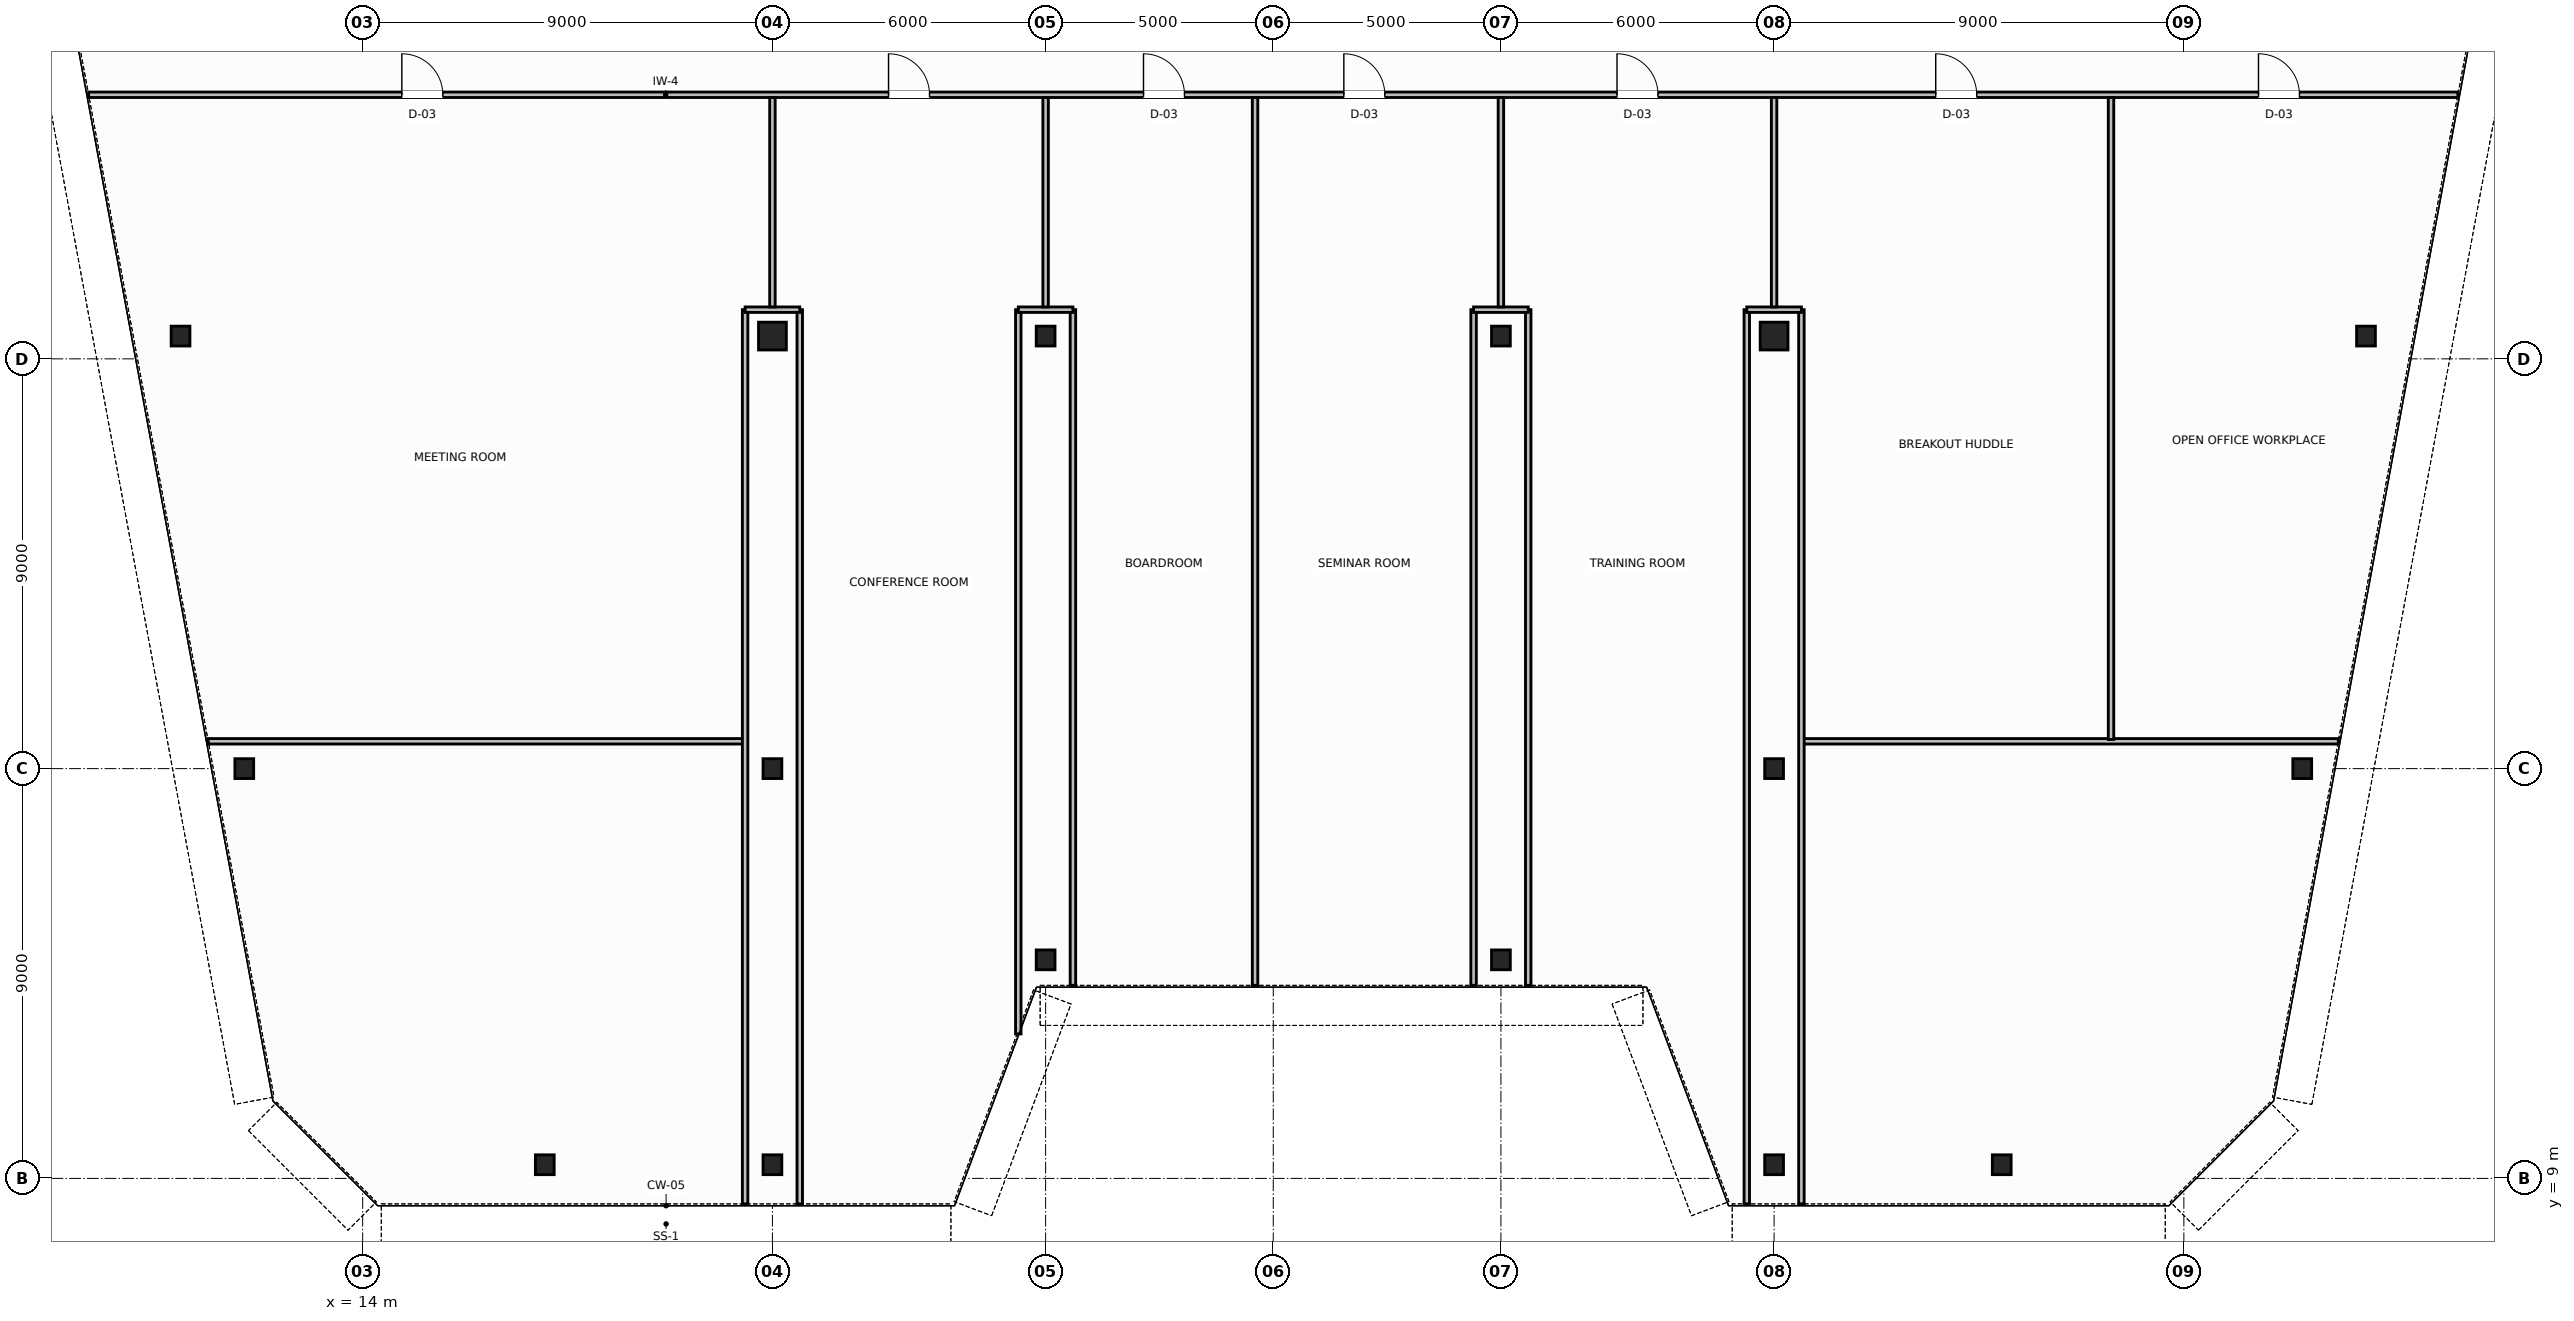
"""IFC4 building model, lengths in metres.
Left out: names, types, materials, properties, quantities, classifications, styles, units other than length and angle.
Written with IfcOpenShell. Run it as: python <this file> out.ifc"""

import sys

from ifc_helpers import new_model, si_unit, direction, frame, frame_2d, origin, origin_2d, place, context, subcontext, project, spatial, rectangle, hollow_circle, i_section, extrude, source, transform, mapped, element, fill, save


model = new_model("IFC4")
c1 = context("Model", 3, precision=1e-05, world=origin(), true_north=direction((0.0, 1.0)))
c2 = subcontext(c1, "Body", "Model", "MODEL_VIEW")
j1 = project(units=[si_unit("LENGTHUNIT", "METRE"), si_unit("PLANEANGLEUNIT", "RADIAN")], contexts=[c1])
p1 = place(None, origin())
s1 = spatial("IfcSite", under=j1, at=p1, CompositionType="ELEMENT")
p2 = place(p1, origin())
s2 = spatial("IfcBuilding", under=s1, at=p2, CompositionType="ELEMENT")
p3 = place(p2, frame((0.0, 0.0, 234.6)))
s3 = spatial("IfcBuildingStorey", under=s2, at=p3, CompositionType="ELEMENT", Elevation=234.6)
m1 = source(origin(), c2, "Body", "SweptSolid", [
    extrude(i_section(OverallWidth=0.412, OverallDepth=0.435, WebThickness=0.036, FlangeThickness=0.05, FilletRadius=0.015, at=origin_2d()), origin(), (0.0, 0.0, 1.0), 3.8),
])
for number, where, z_axis, x_axis in (
    (1, (10.0, 27.5, 0.0), (0.0, 0.0, 1.0), (1.0, 0.0, 0.0)),
    (2, (11.4, 18.0, 0.0), (0.0, 0.0, 1.0), (1.0, 0.0, 0.0)),
    (3, (58.0, 27.5, 0.0), (0.0, 0.0, 1.0), (1.0, 0.0, 0.0)),
    (4, (56.6, 18.0, 0.0), (0.0, 0.0, 1.0), (1.0, 0.0, 0.0)),
):
    element("IfcColumn", number, at=place(p3, frame(where, z_axis=z_axis, x_axis=x_axis)), inside=s3, PredefinedType="COLUMN", context=c2, shape_type="MappedRepresentation", body=[
        mapped(m1, transform((0.0, 0.0, 0.0), scale=1.0)),
    ])
m2 = source(origin(), c2, "Body", "SweptSolid", [
    extrude(hollow_circle(Radius=0.305, WallThickness=0.03, at=origin_2d()), origin(), (0.0, 0.0, 1.0), 3.8),
])
p4 = place(p3, frame((23.0, 27.5, 0.0), z_axis=(0.0, 0.0, 1.0), x_axis=(1.0, 0.0, 0.0)))
e5 = element("IfcColumn", 5, at=p4, inside=s3, PredefinedType="COLUMN", context=c2, shape_type="MappedRepresentation", body=[
    mapped(m2, transform((0.0, 0.0, 0.0), scale=1.0)),
])
m3 = source(origin(), c2, "Body", "SweptSolid", [
    extrude(i_section(OverallWidth=0.412, OverallDepth=0.435, WebThickness=0.036, FlangeThickness=0.05, FilletRadius=0.015, at=origin_2d()), origin(), (0.0, 0.0, 1.0), 3.8),
])
for number, where, z_axis, x_axis in (
    (6, (29.0, 27.5, 0.0), (0.0, 0.0, 1.0), (1.0, 0.0, 0.0)),
    (7, (39.0, 27.5, 0.0), (0.0, 0.0, 1.0), (1.0, 0.0, 0.0)),
):
    element("IfcColumn", number, at=place(p3, frame(where, z_axis=z_axis, x_axis=x_axis)), inside=s3, PredefinedType="COLUMN", context=c2, shape_type="MappedRepresentation", body=[
        mapped(m3, transform((0.0, 0.0, 0.0), scale=1.0)),
    ])
p5 = place(p3, frame((45.0, 27.5, 0.0), z_axis=(0.0, 0.0, 1.0), x_axis=(1.0, 0.0, 0.0)))
e8 = element("IfcColumn", 8, at=p5, inside=s3, PredefinedType="COLUMN", context=c2, shape_type="MappedRepresentation", body=[
    mapped(m2, transform((0.0, 0.0, 0.0), scale=1.0)),
])
for number, where, z_axis, x_axis in (
    (9, (23.0, 18.0, 0.0), (0.0, 0.0, 1.0), (1.0, 0.0, 0.0)),
    (10, (45.0, 18.0, 0.0), (0.0, 0.0, 1.0), (1.0, 0.0, 0.0)),
    (11, (18.0, 9.3, 0.0), (0.0, 0.0, 1.0), (1.0, 0.0, 0.0)),
    (12, (23.0, 9.3, 0.0), (0.0, 0.0, 1.0), (1.0, 0.0, 0.0)),
    (13, (29.0, 13.8, 0.0), (0.0, 0.0, 1.0), (1.0, 0.0, 0.0)),
    (14, (39.0, 13.8, 0.0), (0.0, 0.0, 1.0), (1.0, 0.0, 0.0)),
    (15, (45.0, 9.3, 0.0), (0.0, 0.0, 1.0), (1.0, 0.0, 0.0)),
    (16, (50.0, 9.3, 0.0), (0.0, 0.0, 1.0), (1.0, 0.0, 0.0)),
):
    element("IfcColumn", number, at=place(p3, frame(where, z_axis=z_axis, x_axis=x_axis)), inside=s3, PredefinedType="COLUMN", context=c2, shape_type="MappedRepresentation", body=[
        mapped(m3, transform((0.0, 0.0, 0.0), scale=1.0)),
    ])
p6 = place(p3, frame((7.981, 32.8, 0.0), z_axis=(0.0, 0.0, 1.0), x_axis=(1.0, 0.0, 0.0)))
e17 = element("IfcWall", 17, at=p6, inside=s3, PredefinedType="PARTITIONING", context=c2, shape_type="SweptSolid", body=[
    extrude(rectangle(XDim=52.038, YDim=0.12, at=frame_2d((26.019, 0.0))), origin(), (0.0, 0.0, 1.0), 3.58),
])
p7 = place(p6, frame((6.879, 0.0, 0.0)))
e18 = element("IfcOpeningElement", 18, at=p7, cuts=e17, PredefinedType="OPENING", context=c2, shape_type="SweptSolid", body=[
    extrude(rectangle(XDim=0.9, YDim=2.15, at=frame_2d((0.45, 1.075))), frame((0.0, 0.07, 0.0), z_axis=(0.0, -1.0, 0.0), x_axis=(1.0, 0.0, 0.0)), (0.0, 0.0, 1.0), 0.14),
])
p8 = place(p6, frame((17.569, 0.0, 0.0)))
e19 = element("IfcOpeningElement", 19, at=p8, cuts=e17, PredefinedType="OPENING", context=c2, shape_type="SweptSolid", body=[
    extrude(rectangle(XDim=0.9, YDim=2.15, at=frame_2d((0.45, 1.075))), frame((0.0, 0.07, 0.0), z_axis=(0.0, -1.0, 0.0), x_axis=(1.0, 0.0, 0.0)), (0.0, 0.0, 1.0), 0.14),
])
p9 = place(p6, frame((23.169, 0.0, 0.0)))
e20 = element("IfcOpeningElement", 20, at=p9, cuts=e17, PredefinedType="OPENING", context=c2, shape_type="SweptSolid", body=[
    extrude(rectangle(XDim=0.9, YDim=2.15, at=frame_2d((0.45, 1.075))), frame((0.0, 0.07, 0.0), z_axis=(0.0, -1.0, 0.0), x_axis=(1.0, 0.0, 0.0)), (0.0, 0.0, 1.0), 0.14),
])
p10 = place(p6, frame((27.569, 0.0, 0.0)))
e21 = element("IfcOpeningElement", 21, at=p10, cuts=e17, PredefinedType="OPENING", context=c2, shape_type="SweptSolid", body=[
    extrude(rectangle(XDim=0.9, YDim=2.15, at=frame_2d((0.45, 1.075))), frame((0.0, 0.07, 0.0), z_axis=(0.0, -1.0, 0.0), x_axis=(1.0, 0.0, 0.0)), (0.0, 0.0, 1.0), 0.14),
])
p11 = place(p6, frame((33.569, 0.0, 0.0)))
e22 = element("IfcOpeningElement", 22, at=p11, cuts=e17, PredefinedType="OPENING", context=c2, shape_type="SweptSolid", body=[
    extrude(rectangle(XDim=0.9, YDim=2.15, at=frame_2d((0.45, 1.075))), frame((0.0, 0.07, 0.0), z_axis=(0.0, -1.0, 0.0), x_axis=(1.0, 0.0, 0.0)), (0.0, 0.0, 1.0), 0.14),
])
p12 = place(p6, frame((40.569, 0.0, 0.0)))
e23 = element("IfcOpeningElement", 23, at=p12, cuts=e17, PredefinedType="OPENING", context=c2, shape_type="SweptSolid", body=[
    extrude(rectangle(XDim=0.9, YDim=2.15, at=frame_2d((0.45, 1.075))), frame((0.0, 0.07, 0.0), z_axis=(0.0, -1.0, 0.0), x_axis=(1.0, 0.0, 0.0)), (0.0, 0.0, 1.0), 0.14),
])
p13 = place(p6, frame((47.658, 0.0, 0.0)))
e24 = element("IfcOpeningElement", 24, at=p13, cuts=e17, PredefinedType="OPENING", context=c2, shape_type="SweptSolid", body=[
    extrude(rectangle(XDim=0.9, YDim=2.15, at=frame_2d((0.45, 1.075))), frame((0.0, 0.07, 0.0), z_axis=(0.0, -1.0, 0.0), x_axis=(1.0, 0.0, 0.0)), (0.0, 0.0, 1.0), 0.14),
])
for number, where, z_axis, x_axis in (
    (25, (10.608, 18.6, 0.0), (0.0, 0.0, 1.0), (1.0, 0.0, 0.0)),
    (26, (45.64, 18.6, 0.0), (0.0, 0.0, 1.0), (1.0, 0.0, 0.0)),
):
    element("IfcWall", number, at=place(p3, frame(where, z_axis=z_axis, x_axis=x_axis)), inside=s3, PredefinedType="PARTITIONING", context=c2, shape_type="SweptSolid", body=[
        extrude(rectangle(XDim=11.752, YDim=0.12, at=frame_2d((5.876, 0.0))), origin(), (0.0, 0.0, 1.0), 3.58),
    ])
for number, where, z_axis, x_axis in (
    (27, (22.4, 8.44, 0.0), (0.0, 0.0, 1.0), (0.0, 1.0, 0.0)),
    (28, (23.6, 8.44, 0.0), (0.0, 0.0, 1.0), (0.0, 1.0, 0.0)),
):
    element("IfcWall", number, at=place(p3, frame(where, z_axis=z_axis, x_axis=x_axis)), inside=s3, PredefinedType="PARTITIONING", context=c2, shape_type="SweptSolid", body=[
        extrude(rectangle(XDim=19.64, YDim=0.12, at=frame_2d((9.82, 0.0))), origin(), (0.0, 0.0, 1.0), 3.58),
    ])
p14 = place(p3, frame((22.4, 28.08, 0.0), z_axis=(0.0, 0.0, 1.0), x_axis=(1.0, 0.0, 0.0)))
e29 = element("IfcWall", 29, at=p14, inside=s3, PredefinedType="PARTITIONING", context=c2, shape_type="SweptSolid", body=[
    extrude(rectangle(XDim=1.2, YDim=0.12, at=frame_2d((0.6, 0.0))), origin(), (0.0, 0.0, 1.0), 3.58),
])
p15 = place(p3, frame((23.0, 28.14, 0.0), z_axis=(0.0, 0.0, 1.0), x_axis=(0.0, 1.0, 0.0)))
e30 = element("IfcWall", 30, at=p15, inside=s3, PredefinedType="PARTITIONING", context=c2, shape_type="SweptSolid", body=[
    extrude(rectangle(XDim=4.6, YDim=0.12, at=frame_2d((2.3, 0.0))), origin(), (0.0, 0.0, 1.0), 2.37),
])
p16 = place(p3, frame((28.4, 12.173, 0.0), z_axis=(0.0, 0.0, 1.0), x_axis=(0.0, 1.0, 0.0)))
e31 = element("IfcWall", 31, at=p16, inside=s3, PredefinedType="PARTITIONING", context=c2, shape_type="SweptSolid", body=[
    extrude(rectangle(XDim=15.907, YDim=0.12, at=frame_2d((7.953, 0.0))), origin(), (0.0, 0.0, 1.0), 3.58),
])
p17 = place(p3, frame((29.6, 13.24, 0.0), z_axis=(0.0, 0.0, 1.0), x_axis=(0.0, 1.0, 0.0)))
e32 = element("IfcWall", 32, at=p17, inside=s3, PredefinedType="PARTITIONING", context=c2, shape_type="SweptSolid", body=[
    extrude(rectangle(XDim=14.84, YDim=0.12, at=frame_2d((7.42, 0.0))), origin(), (0.0, 0.0, 1.0), 3.58),
])
p18 = place(p3, frame((28.4, 28.08, 0.0), z_axis=(0.0, 0.0, 1.0), x_axis=(1.0, 0.0, 0.0)))
e33 = element("IfcWall", 33, at=p18, inside=s3, PredefinedType="PARTITIONING", context=c2, shape_type="SweptSolid", body=[
    extrude(rectangle(XDim=1.2, YDim=0.12, at=frame_2d((0.6, 0.0))), origin(), (0.0, 0.0, 1.0), 3.58),
])
p19 = place(p3, frame((29.0, 28.14, 0.0), z_axis=(0.0, 0.0, 1.0), x_axis=(0.0, 1.0, 0.0)))
e34 = element("IfcWall", 34, at=p19, inside=s3, PredefinedType="PARTITIONING", context=c2, shape_type="SweptSolid", body=[
    extrude(rectangle(XDim=4.6, YDim=0.12, at=frame_2d((2.3, 0.0))), origin(), (0.0, 0.0, 1.0), 2.37),
])
for number, where, z_axis, x_axis in (
    (35, (38.4, 13.24, 0.0), (0.0, 0.0, 1.0), (0.0, 1.0, 0.0)),
    (36, (39.6, 13.24, 0.0), (0.0, 0.0, 1.0), (0.0, 1.0, 0.0)),
):
    element("IfcWall", number, at=place(p3, frame(where, z_axis=z_axis, x_axis=x_axis)), inside=s3, PredefinedType="PARTITIONING", context=c2, shape_type="SweptSolid", body=[
        extrude(rectangle(XDim=14.84, YDim=0.12, at=frame_2d((7.42, 0.0))), origin(), (0.0, 0.0, 1.0), 3.58),
    ])
p20 = place(p3, frame((38.4, 28.08, 0.0), z_axis=(0.0, 0.0, 1.0), x_axis=(1.0, 0.0, 0.0)))
e37 = element("IfcWall", 37, at=p20, inside=s3, PredefinedType="PARTITIONING", context=c2, shape_type="SweptSolid", body=[
    extrude(rectangle(XDim=1.2, YDim=0.12, at=frame_2d((0.6, 0.0))), origin(), (0.0, 0.0, 1.0), 3.58),
])
p21 = place(p3, frame((39.0, 28.14, 0.0), z_axis=(0.0, 0.0, 1.0), x_axis=(0.0, 1.0, 0.0)))
e38 = element("IfcWall", 38, at=p21, inside=s3, PredefinedType="PARTITIONING", context=c2, shape_type="SweptSolid", body=[
    extrude(rectangle(XDim=4.6, YDim=0.12, at=frame_2d((2.3, 0.0))), origin(), (0.0, 0.0, 1.0), 2.37),
])
for number, where, z_axis, x_axis in (
    (39, (44.4, 8.44, 0.0), (0.0, 0.0, 1.0), (0.0, 1.0, 0.0)),
    (40, (45.6, 8.44, 0.0), (0.0, 0.0, 1.0), (0.0, 1.0, 0.0)),
):
    element("IfcWall", number, at=place(p3, frame(where, z_axis=z_axis, x_axis=x_axis)), inside=s3, PredefinedType="PARTITIONING", context=c2, shape_type="SweptSolid", body=[
        extrude(rectangle(XDim=19.64, YDim=0.12, at=frame_2d((9.82, 0.0))), origin(), (0.0, 0.0, 1.0), 3.58),
    ])
p22 = place(p3, frame((44.4, 28.08, 0.0), z_axis=(0.0, 0.0, 1.0), x_axis=(1.0, 0.0, 0.0)))
e41 = element("IfcWall", 41, at=p22, inside=s3, PredefinedType="PARTITIONING", context=c2, shape_type="SweptSolid", body=[
    extrude(rectangle(XDim=1.2, YDim=0.12, at=frame_2d((0.6, 0.0))), origin(), (0.0, 0.0, 1.0), 3.58),
])
p23 = place(p3, frame((45.0, 28.14, 0.0), z_axis=(0.0, 0.0, 1.0), x_axis=(0.0, 1.0, 0.0)))
e42 = element("IfcWall", 42, at=p23, inside=s3, PredefinedType="PARTITIONING", context=c2, shape_type="SweptSolid", body=[
    extrude(rectangle(XDim=4.6, YDim=0.12, at=frame_2d((2.3, 0.0))), origin(), (0.0, 0.0, 1.0), 2.37),
])
p24 = place(p3, frame((33.6, 13.24, 0.0), z_axis=(0.0, 0.0, 1.0), x_axis=(0.0, 1.0, 0.0)))
e43 = element("IfcWall", 43, at=p24, inside=s3, PredefinedType="PARTITIONING", context=c2, shape_type="SweptSolid", body=[
    extrude(rectangle(XDim=19.5, YDim=0.12, at=frame_2d((9.75, 0.0))), origin(), (0.0, 0.0, 1.0), 3.58),
])
p25 = place(p3, frame((52.4, 18.64, 0.0), z_axis=(0.0, 0.0, 1.0), x_axis=(0.0, 1.0, 0.0)))
e44 = element("IfcWall", 44, at=p25, inside=s3, PredefinedType="PARTITIONING", context=c2, shape_type="SweptSolid", body=[
    extrude(rectangle(XDim=14.1, YDim=0.12, at=frame_2d((7.05, 0.0))), origin(), (0.0, 0.0, 1.0), 3.58),
])
m4 = source(origin(), c2, "Body", "SweptSolid", [
    extrude(rectangle(XDim=0.9, YDim=2.15, at=frame_2d((0.45, 1.075))), frame((0.0, 0.025, 0.0), z_axis=(0.0, -1.0, 0.0), x_axis=(1.0, 0.0, 0.0)), (0.0, 0.0, 1.0), 0.05),
])
p26 = place(p7, origin())
e45 = element("IfcDoor", 45, at=p26, inside=s3, OperationType="SINGLE_SWING_LEFT", PredefinedType="DOOR", context=c2, shape_type="MappedRepresentation", body=[
    mapped(m4, transform((0.0, 0.0, 0.0), scale=1.0)),
])
fill(e18, e45)
p27 = place(p8, origin())
e46 = element("IfcDoor", 46, at=p27, inside=s3, OperationType="SINGLE_SWING_RIGHT", PredefinedType="DOOR", context=c2, shape_type="MappedRepresentation", body=[
    mapped(m4, transform((0.0, 0.0, 0.0), scale=1.0)),
])
fill(e19, e46)
p28 = place(p9, origin())
e47 = element("IfcDoor", 47, at=p28, inside=s3, OperationType="SINGLE_SWING_LEFT", PredefinedType="DOOR", context=c2, shape_type="MappedRepresentation", body=[
    mapped(m4, transform((0.0, 0.0, 0.0), scale=1.0)),
])
fill(e20, e47)
p29 = place(p10, origin())
e48 = element("IfcDoor", 48, at=p29, inside=s3, OperationType="SINGLE_SWING_RIGHT", PredefinedType="DOOR", context=c2, shape_type="MappedRepresentation", body=[
    mapped(m4, transform((0.0, 0.0, 0.0), scale=1.0)),
])
fill(e21, e48)
p30 = place(p11, origin())
e49 = element("IfcDoor", 49, at=p30, inside=s3, OperationType="SINGLE_SWING_LEFT", PredefinedType="DOOR", context=c2, shape_type="MappedRepresentation", body=[
    mapped(m4, transform((0.0, 0.0, 0.0), scale=1.0)),
])
fill(e22, e49)
p31 = place(p12, origin())
e50 = element("IfcDoor", 50, at=p31, inside=s3, OperationType="SINGLE_SWING_RIGHT", PredefinedType="DOOR", context=c2, shape_type="MappedRepresentation", body=[
    mapped(m4, transform((0.0, 0.0, 0.0), scale=1.0)),
])
fill(e23, e50)
p32 = place(p13, origin())
e51 = element("IfcDoor", 51, at=p32, inside=s3, OperationType="SINGLE_SWING_LEFT", PredefinedType="DOOR", context=c2, shape_type="MappedRepresentation", body=[
    mapped(m4, transform((0.0, 0.0, 0.0), scale=1.0)),
])
fill(e24, e51)
save(model, sys.argv[1])
